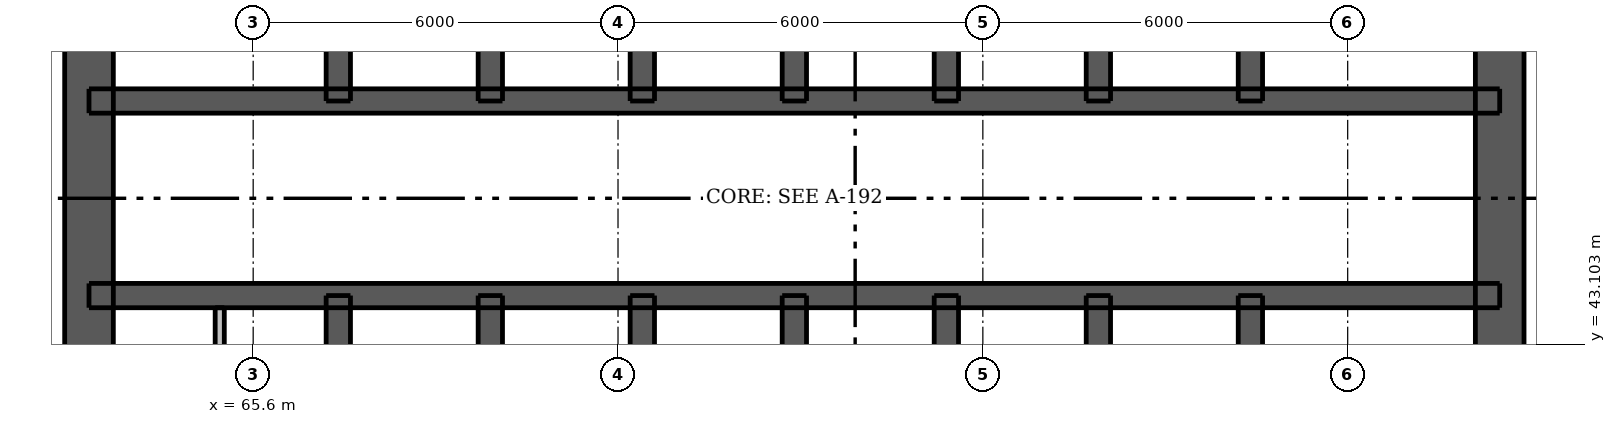
"""IFC4 building model, lengths in metres.
Left out: names, types, materials, properties, quantities, classifications, styles, units other than length and angle.
Written with IfcOpenShell. Run it as: python <this file> out.ifc"""

import sys

from ifc_helpers import new_model, si_unit, direction, frame, frame_2d, origin, place, context, subcontext, project, spatial, rectangle, extrude, element, fill, save


model = new_model("IFC4")
c1 = context("Model", 3, precision=1e-05, world=origin(), true_north=direction((0.0, 1.0)))
c2 = subcontext(c1, "Body", "Model", "MODEL_VIEW")
j1 = project(units=[si_unit("LENGTHUNIT", "METRE"), si_unit("PLANEANGLEUNIT", "RADIAN")], contexts=[c1])
p1 = place(None, origin())
s1 = spatial("IfcSite", under=j1, at=p1, CompositionType="ELEMENT")
p2 = place(p1, origin())
s2 = spatial("IfcBuilding", under=s1, at=p2, CompositionType="ELEMENT")
p3 = place(p2, frame((0.0, 0.0, 78.7)))
s3 = spatial("IfcBuildingStorey", under=s2, at=p3, CompositionType="ELEMENT", Elevation=78.7)
p4 = place(p3, frame((62.9, 33.5, 0.0), z_axis=(0.0, 0.0, 1.0), x_axis=(0.0, 1.0, 0.0)))
e1 = element("IfcWall", 1, at=p4, inside=s3, PredefinedType="SHEAR", context=c2, shape_type="SweptSolid", body=[
    extrude(rectangle(XDim=24.0, YDim=0.8, at=frame_2d((12.0, 0.0))), origin(), (0.0, 0.0, 1.0), 3.05),
])
p5 = place(p4, frame((11.2, 0.0, 0.0)))
e2 = element("IfcOpeningElement", 2, at=p5, cuts=e1, PredefinedType="OPENING", context=c2, shape_type="SweptSolid", body=[
    extrude(rectangle(XDim=1.6, YDim=2.1, at=frame_2d((0.8, 1.05))), frame((0.0, 0.41, 0.0), z_axis=(0.0, -1.0, 0.0), x_axis=(1.0, 0.0, 0.0)), (0.0, 0.0, 1.0), 0.82),
])
p6 = place(p3, frame((86.1, 33.5, 0.0), z_axis=(0.0, 0.0, 1.0), x_axis=(0.0, 1.0, 0.0)))
e3 = element("IfcWall", 3, at=p6, inside=s3, PredefinedType="SHEAR", context=c2, shape_type="SweptSolid", body=[
    extrude(rectangle(XDim=24.0, YDim=0.8, at=frame_2d((12.0, 0.0))), origin(), (0.0, 0.0, 1.0), 3.05),
])
p7 = place(p6, frame((11.2, 0.0, 0.0)))
e4 = element("IfcOpeningElement", 4, at=p7, cuts=e3, PredefinedType="OPENING", context=c2, shape_type="SweptSolid", body=[
    extrude(rectangle(XDim=1.6, YDim=2.1, at=frame_2d((0.8, 1.05))), frame((0.0, 0.41, 0.0), z_axis=(0.0, -1.0, 0.0), x_axis=(1.0, 0.0, 0.0)), (0.0, 0.0, 1.0), 0.82),
])
p8 = place(p3, frame((62.9, 43.9, 0.0), z_axis=(0.0, 0.0, 1.0), x_axis=(1.0, 0.0, 0.0)))
e5 = element("IfcWall", 5, at=p8, inside=s3, PredefinedType="SHEAR", context=c2, shape_type="SweptSolid", body=[
    extrude(rectangle(XDim=23.2, YDim=0.4, at=frame_2d((11.6, 0.0))), origin(), (0.0, 0.0, 1.0), 3.05),
])
p9 = place(p8, frame((0.825, 0.0, 0.0)))
e6 = element("IfcOpeningElement", 6, at=p9, cuts=e5, PredefinedType="OPENING", context=c2, shape_type="SweptSolid", body=[
    extrude(rectangle(XDim=0.9, YDim=2.1, at=frame_2d((0.45, 1.05))), frame((0.0, 0.21, 0.0), z_axis=(0.0, -1.0, 0.0), x_axis=(1.0, 0.0, 0.0)), (0.0, 0.0, 1.0), 0.42),
])
p10 = place(p8, frame((2.575, 0.0, 0.0)))
e7 = element("IfcOpeningElement", 7, at=p10, cuts=e5, PredefinedType="OPENING", context=c2, shape_type="SweptSolid", body=[
    extrude(rectangle(XDim=0.9, YDim=2.1, at=frame_2d((0.45, 1.05))), frame((0.0, 0.21, 0.0), z_axis=(0.0, -1.0, 0.0), x_axis=(1.0, 0.0, 0.0)), (0.0, 0.0, 1.0), 0.42),
])
p11 = place(p8, frame((20.6, 0.0, 0.0)))
e8 = element("IfcOpeningElement", 8, at=p11, cuts=e5, PredefinedType="OPENING", context=c2, shape_type="SweptSolid", body=[
    extrude(rectangle(XDim=0.9, YDim=2.1, at=frame_2d((0.45, 1.05))), frame((0.0, 0.21, 0.0), z_axis=(0.0, -1.0, 0.0), x_axis=(1.0, 0.0, 0.0)), (0.0, 0.0, 1.0), 0.42),
])
p12 = place(p8, frame((4.8, 0.0, 0.0)))
e9 = element("IfcOpeningElement", 9, at=p12, cuts=e5, PredefinedType="OPENING", context=c2, shape_type="SweptSolid", body=[
    extrude(rectangle(XDim=1.1, YDim=2.1, at=frame_2d((0.55, 1.05))), frame((0.0, 0.21, 0.0), z_axis=(0.0, -1.0, 0.0), x_axis=(1.0, 0.0, 0.0)), (0.0, 0.0, 1.0), 0.42),
])
p13 = place(p8, frame((7.3, 0.0, 0.0)))
e10 = element("IfcOpeningElement", 10, at=p13, cuts=e5, PredefinedType="OPENING", context=c2, shape_type="SweptSolid", body=[
    extrude(rectangle(XDim=1.1, YDim=2.1, at=frame_2d((0.55, 1.05))), frame((0.0, 0.21, 0.0), z_axis=(0.0, -1.0, 0.0), x_axis=(1.0, 0.0, 0.0)), (0.0, 0.0, 1.0), 0.42),
])
p14 = place(p8, frame((9.8, 0.0, 0.0)))
e11 = element("IfcOpeningElement", 11, at=p14, cuts=e5, PredefinedType="OPENING", context=c2, shape_type="SweptSolid", body=[
    extrude(rectangle(XDim=1.1, YDim=2.1, at=frame_2d((0.55, 1.05))), frame((0.0, 0.21, 0.0), z_axis=(0.0, -1.0, 0.0), x_axis=(1.0, 0.0, 0.0)), (0.0, 0.0, 1.0), 0.42),
])
p15 = place(p8, frame((12.3, 0.0, 0.0)))
e12 = element("IfcOpeningElement", 12, at=p15, cuts=e5, PredefinedType="OPENING", context=c2, shape_type="SweptSolid", body=[
    extrude(rectangle(XDim=1.1, YDim=2.1, at=frame_2d((0.55, 1.05))), frame((0.0, 0.21, 0.0), z_axis=(0.0, -1.0, 0.0), x_axis=(1.0, 0.0, 0.0)), (0.0, 0.0, 1.0), 0.42),
])
p16 = place(p8, frame((14.8, 0.0, 0.0)))
e13 = element("IfcOpeningElement", 13, at=p16, cuts=e5, PredefinedType="OPENING", context=c2, shape_type="SweptSolid", body=[
    extrude(rectangle(XDim=1.1, YDim=2.1, at=frame_2d((0.55, 1.05))), frame((0.0, 0.21, 0.0), z_axis=(0.0, -1.0, 0.0), x_axis=(1.0, 0.0, 0.0)), (0.0, 0.0, 1.0), 0.42),
])
p17 = place(p8, frame((17.3, 0.0, 0.0)))
e14 = element("IfcOpeningElement", 14, at=p17, cuts=e5, PredefinedType="OPENING", context=c2, shape_type="SweptSolid", body=[
    extrude(rectangle(XDim=1.1, YDim=2.1, at=frame_2d((0.55, 1.05))), frame((0.0, 0.21, 0.0), z_axis=(0.0, -1.0, 0.0), x_axis=(1.0, 0.0, 0.0)), (0.0, 0.0, 1.0), 0.42),
])
p18 = place(p3, frame((62.9, 47.1, 0.0), z_axis=(0.0, 0.0, 1.0), x_axis=(1.0, 0.0, 0.0)))
e15 = element("IfcWall", 15, at=p18, inside=s3, PredefinedType="SHEAR", context=c2, shape_type="SweptSolid", body=[
    extrude(rectangle(XDim=23.2, YDim=0.4, at=frame_2d((11.6, 0.0))), origin(), (0.0, 0.0, 1.0), 3.05),
])
p19 = place(p18, frame((1.7, 0.0, 0.0)))
e16 = element("IfcOpeningElement", 16, at=p19, cuts=e15, PredefinedType="OPENING", context=c2, shape_type="SweptSolid", body=[
    extrude(rectangle(XDim=0.9, YDim=2.1, at=frame_2d((0.45, 1.05))), frame((0.0, 0.21, 0.0), z_axis=(0.0, -1.0, 0.0), x_axis=(1.0, 0.0, 0.0)), (0.0, 0.0, 1.0), 0.42),
])
p20 = place(p18, frame((20.6, 0.0, 0.0)))
e17 = element("IfcOpeningElement", 17, at=p20, cuts=e15, PredefinedType="OPENING", context=c2, shape_type="SweptSolid", body=[
    extrude(rectangle(XDim=0.9, YDim=2.1, at=frame_2d((0.45, 1.05))), frame((0.0, 0.21, 0.0), z_axis=(0.0, -1.0, 0.0), x_axis=(1.0, 0.0, 0.0)), (0.0, 0.0, 1.0), 0.42),
])
p21 = place(p3, frame((67.0, 33.9, 0.0), z_axis=(0.0, 0.0, 1.0), x_axis=(0.0, 1.0, 0.0)))
e18 = element("IfcWall", 18, at=p21, inside=s3, PredefinedType="SHEAR", context=c2, shape_type="SweptSolid", body=[
    extrude(rectangle(XDim=10.0, YDim=0.4, at=frame_2d((5.0, 0.0))), origin(), (0.0, 0.0, 1.0), 3.05),
])
p22 = place(p21, frame((0.6, 0.0, 0.0)))
e19 = element("IfcOpeningElement", 19, at=p22, cuts=e18, PredefinedType="OPENING", context=c2, shape_type="SweptSolid", body=[
    extrude(rectangle(XDim=1.1, YDim=2.1, at=frame_2d((0.55, 1.05))), frame((0.0, 0.21, 0.0), z_axis=(0.0, -1.0, 0.0), x_axis=(1.0, 0.0, 0.0)), (0.0, 0.0, 1.0), 0.42),
])
for number, where, z_axis, x_axis in (
    (20, (67.0, 47.1, 0.0), (0.0, 0.0, 1.0), (0.0, 1.0, 0.0)),
    (21, (82.0, 33.9, 0.0), (0.0, 0.0, 1.0), (0.0, 1.0, 0.0)),
    (22, (82.0, 47.1, 0.0), (0.0, 0.0, 1.0), (0.0, 1.0, 0.0)),
):
    element("IfcWall", number, at=place(p3, frame(where, z_axis=z_axis, x_axis=x_axis)), inside=s3, PredefinedType="SHEAR", context=c2, shape_type="SweptSolid", body=[
        extrude(rectangle(XDim=10.0, YDim=0.4, at=frame_2d((5.0, 0.0))), origin(), (0.0, 0.0, 1.0), 3.05),
    ])
for number, where, z_axis, x_axis in (
    (23, (69.5, 41.0, 0.0), (0.0, 0.0, 1.0), (0.0, 1.0, 0.0)),
    (24, (69.5, 47.1, 0.0), (0.0, 0.0, 1.0), (0.0, 1.0, 0.0)),
    (25, (72.0, 41.0, 0.0), (0.0, 0.0, 1.0), (0.0, 1.0, 0.0)),
    (26, (72.0, 47.1, 0.0), (0.0, 0.0, 1.0), (0.0, 1.0, 0.0)),
    (27, (74.5, 41.0, 0.0), (0.0, 0.0, 1.0), (0.0, 1.0, 0.0)),
    (28, (74.5, 47.1, 0.0), (0.0, 0.0, 1.0), (0.0, 1.0, 0.0)),
    (29, (77.0, 41.0, 0.0), (0.0, 0.0, 1.0), (0.0, 1.0, 0.0)),
    (30, (77.0, 47.1, 0.0), (0.0, 0.0, 1.0), (0.0, 1.0, 0.0)),
    (31, (79.5, 41.0, 0.0), (0.0, 0.0, 1.0), (0.0, 1.0, 0.0)),
    (32, (79.5, 47.1, 0.0), (0.0, 0.0, 1.0), (0.0, 1.0, 0.0)),
):
    element("IfcWall", number, at=place(p3, frame(where, z_axis=z_axis, x_axis=x_axis)), inside=s3, PredefinedType="SHEAR", context=c2, shape_type="SweptSolid", body=[
        extrude(rectangle(XDim=2.9, YDim=0.4, at=frame_2d((1.45, 0.0))), origin(), (0.0, 0.0, 1.0), 3.05),
    ])
p23 = place(p3, frame((65.05, 41.2, 0.0), z_axis=(0.0, 0.0, 1.0), x_axis=(0.0, 1.0, 0.0)))
e33 = element("IfcWall", 33, at=p23, inside=s3, PredefinedType="PLUMBINGWALL", context=c2, shape_type="SweptSolid", body=[
    extrude(rectangle(XDim=2.5, YDim=0.15, at=frame_2d((1.25, 0.0))), origin(), (0.0, 0.0, 1.0), 3.05),
])
p24 = place(p5, origin())
e34 = element("IfcDoor", 34, at=p24, inside=s3, OperationType="DOUBLE_DOOR_SINGLE_SWING", PredefinedType="DOOR", context=c2, shape_type="SweptSolid", body=[
    extrude(rectangle(XDim=1.6, YDim=2.1, at=frame_2d((0.8, 1.05))), frame((0.0, -0.337, 0.0), z_axis=(0.0, -1.0, 0.0), x_axis=(1.0, 0.0, 0.0)), (0.0, 0.0, 1.0), 0.05),
])
fill(e2, e34)
p25 = place(p7, origin())
e35 = element("IfcDoor", 35, at=p25, inside=s3, OperationType="DOUBLE_DOOR_SINGLE_SWING", PredefinedType="DOOR", context=c2, shape_type="SweptSolid", body=[
    extrude(rectangle(XDim=1.6, YDim=2.1, at=frame_2d((0.8, 1.05))), frame((0.0, 0.388, 0.0), z_axis=(0.0, -1.0, 0.0), x_axis=(1.0, 0.0, 0.0)), (0.0, 0.0, 1.0), 0.05),
])
fill(e4, e35)
p26 = place(p9, origin())
e36 = element("IfcDoor", 36, at=p26, inside=s3, OperationType="SINGLE_SWING_LEFT", PredefinedType="DOOR", context=c2, shape_type="SweptSolid", body=[
    extrude(rectangle(XDim=0.9, YDim=2.1, at=frame_2d((0.45, 1.05))), frame((0.0, -0.138, 0.0), z_axis=(0.0, -1.0, 0.0), x_axis=(1.0, 0.0, 0.0)), (0.0, 0.0, 1.0), 0.05),
])
fill(e6, e36)
p27 = place(p10, origin())
e37 = element("IfcDoor", 37, at=p27, inside=s3, OperationType="SINGLE_SWING_RIGHT", PredefinedType="DOOR", context=c2, shape_type="SweptSolid", body=[
    extrude(rectangle(XDim=0.9, YDim=2.1, at=frame_2d((0.45, 1.05))), frame((0.0, -0.138, 0.0), z_axis=(0.0, -1.0, 0.0), x_axis=(1.0, 0.0, 0.0)), (0.0, 0.0, 1.0), 0.05),
])
fill(e7, e37)
p28 = place(p11, origin())
e38 = element("IfcDoor", 38, at=p28, inside=s3, OperationType="SINGLE_SWING_LEFT", PredefinedType="DOOR", context=c2, shape_type="SweptSolid", body=[
    extrude(rectangle(XDim=0.9, YDim=2.1, at=frame_2d((0.45, 1.05))), frame((0.0, -0.138, 0.0), z_axis=(0.0, -1.0, 0.0), x_axis=(1.0, 0.0, 0.0)), (0.0, 0.0, 1.0), 0.05),
])
fill(e8, e38)
p29 = place(p19, origin())
e39 = element("IfcDoor", 39, at=p29, inside=s3, OperationType="SINGLE_SWING_LEFT", PredefinedType="DOOR", context=c2, shape_type="SweptSolid", body=[
    extrude(rectangle(XDim=0.9, YDim=2.1, at=frame_2d((0.45, 1.05))), frame((0.0, 0.188, 0.0), z_axis=(0.0, -1.0, 0.0), x_axis=(1.0, 0.0, 0.0)), (0.0, 0.0, 1.0), 0.05),
])
fill(e16, e39)
p30 = place(p20, origin())
e40 = element("IfcDoor", 40, at=p30, inside=s3, OperationType="SINGLE_SWING_LEFT", PredefinedType="DOOR", context=c2, shape_type="SweptSolid", body=[
    extrude(rectangle(XDim=0.9, YDim=2.1, at=frame_2d((0.45, 1.05))), frame((0.0, 0.188, 0.0), z_axis=(0.0, -1.0, 0.0), x_axis=(1.0, 0.0, 0.0)), (0.0, 0.0, 1.0), 0.05),
])
fill(e17, e40)
p31 = place(p12, origin())
e41 = element("IfcDoor", 41, at=p31, inside=s3, OperationType="DOUBLE_DOOR_SLIDING", PredefinedType="DOOR", context=c2, shape_type="SweptSolid", body=[
    extrude(rectangle(XDim=1.1, YDim=2.1, at=frame_2d((0.55, 1.05))), frame((0.0, 0.025, 0.0), z_axis=(0.0, -1.0, 0.0), x_axis=(1.0, 0.0, 0.0)), (0.0, 0.0, 1.0), 0.05),
])
fill(e9, e41)
p32 = place(p13, origin())
e42 = element("IfcDoor", 42, at=p32, inside=s3, OperationType="DOUBLE_DOOR_SLIDING", PredefinedType="DOOR", context=c2, shape_type="SweptSolid", body=[
    extrude(rectangle(XDim=1.1, YDim=2.1, at=frame_2d((0.55, 1.05))), frame((0.0, 0.025, 0.0), z_axis=(0.0, -1.0, 0.0), x_axis=(1.0, 0.0, 0.0)), (0.0, 0.0, 1.0), 0.05),
])
fill(e10, e42)
p33 = place(p14, origin())
e43 = element("IfcDoor", 43, at=p33, inside=s3, OperationType="DOUBLE_DOOR_SLIDING", PredefinedType="DOOR", context=c2, shape_type="SweptSolid", body=[
    extrude(rectangle(XDim=1.1, YDim=2.1, at=frame_2d((0.55, 1.05))), frame((0.0, 0.025, 0.0), z_axis=(0.0, -1.0, 0.0), x_axis=(1.0, 0.0, 0.0)), (0.0, 0.0, 1.0), 0.05),
])
fill(e11, e43)
p34 = place(p15, origin())
e44 = element("IfcDoor", 44, at=p34, inside=s3, OperationType="DOUBLE_DOOR_SLIDING", PredefinedType="DOOR", context=c2, shape_type="SweptSolid", body=[
    extrude(rectangle(XDim=1.1, YDim=2.1, at=frame_2d((0.55, 1.05))), frame((0.0, 0.025, 0.0), z_axis=(0.0, -1.0, 0.0), x_axis=(1.0, 0.0, 0.0)), (0.0, 0.0, 1.0), 0.05),
])
fill(e12, e44)
p35 = place(p16, origin())
e45 = element("IfcDoor", 45, at=p35, inside=s3, OperationType="DOUBLE_DOOR_SLIDING", PredefinedType="DOOR", context=c2, shape_type="SweptSolid", body=[
    extrude(rectangle(XDim=1.1, YDim=2.1, at=frame_2d((0.55, 1.05))), frame((0.0, 0.025, 0.0), z_axis=(0.0, -1.0, 0.0), x_axis=(1.0, 0.0, 0.0)), (0.0, 0.0, 1.0), 0.05),
])
fill(e13, e45)
p36 = place(p17, origin())
e46 = element("IfcDoor", 46, at=p36, inside=s3, OperationType="DOUBLE_DOOR_SLIDING", PredefinedType="DOOR", context=c2, shape_type="SweptSolid", body=[
    extrude(rectangle(XDim=1.1, YDim=2.1, at=frame_2d((0.55, 1.05))), frame((0.0, 0.025, 0.0), z_axis=(0.0, -1.0, 0.0), x_axis=(1.0, 0.0, 0.0)), (0.0, 0.0, 1.0), 0.05),
])
fill(e14, e46)
save(model, sys.argv[1])
